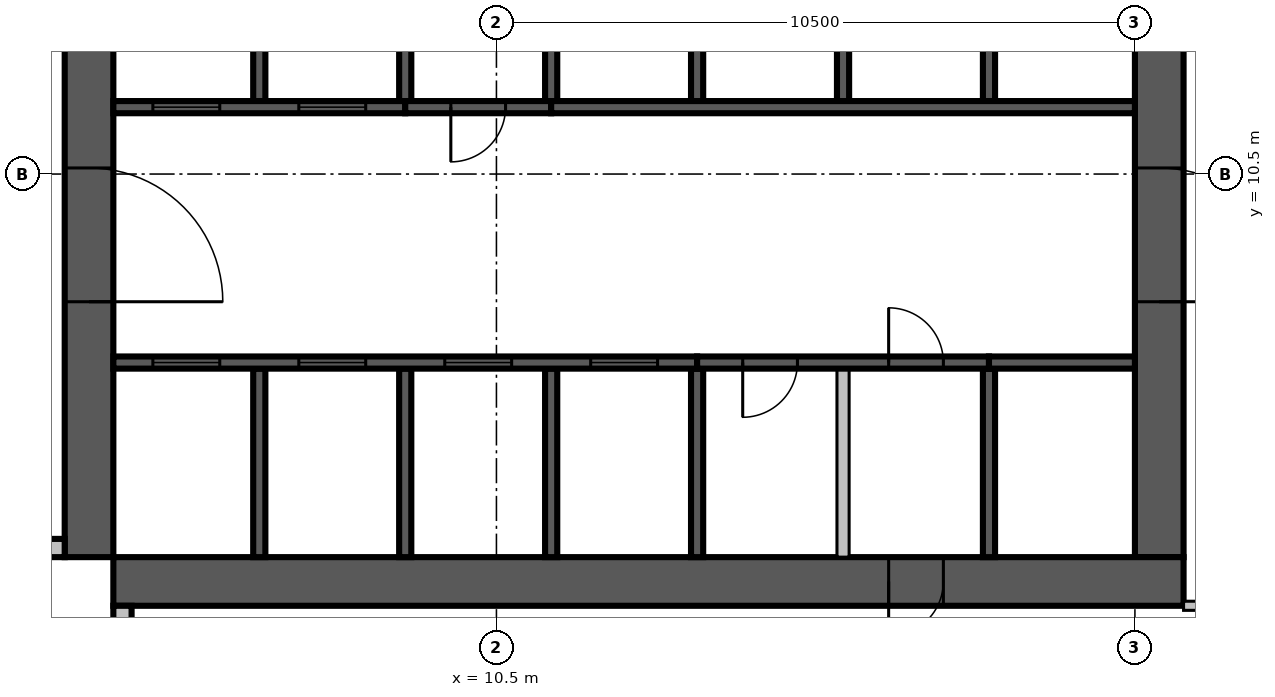
"""IFC4 building model, lengths in metres.
Left out: names, types, materials, properties, quantities, classifications, styles, units other than length and angle.
Written with IfcOpenShell. Run it as: python <this file> out.ifc"""

import sys

from ifc_helpers import new_model, si_unit, direction, frame, frame_2d, origin, place, context, subcontext, project, spatial, rectangle, extrude, source, transform, mapped, element, fill, save


model = new_model("IFC4")
c1 = context("Model", 3, precision=1e-05, world=origin(), true_north=direction((0.0, 1.0)))
c2 = subcontext(c1, "Body", "Model", "MODEL_VIEW")
j1 = project(units=[si_unit("LENGTHUNIT", "METRE"), si_unit("PLANEANGLEUNIT", "RADIAN")], contexts=[c1])
p1 = place(None, origin())
s1 = spatial("IfcSite", under=j1, at=p1, CompositionType="ELEMENT")
p2 = place(p1, origin())
s2 = spatial("IfcBuilding", under=s1, at=p2, CompositionType="ELEMENT")
p3 = place(p2, frame((0.0, 0.0, 238.6)))
s3 = spatial("IfcBuildingStorey", under=s2, at=p3, CompositionType="ELEMENT", Elevation=238.6)
m1 = source(origin(), c2, "Body", "SweptSolid", [
    extrude(rectangle(XDim=17.6, YDim=0.8, at=frame_2d((8.8, 0.0))), origin(), (0.0, 0.0, 1.0), 3.8),
])
p4 = place(p3, frame((3.8, 4.2, 0.0), z_axis=(0.0, 0.0, 1.0), x_axis=(0.0, 1.0, 0.0)))
e1 = element("IfcWall", 1, at=p4, inside=s3, PredefinedType="SHEAR", context=c2, shape_type="MappedRepresentation", body=[
    mapped(m1, transform((0.0, 0.0, 0.0), scale=1.0)),
])
m2 = source(origin(), c2, "Body", "SweptSolid", [
    extrude(rectangle(XDim=2.2, YDim=2.1, at=frame_2d((1.1, 1.05))), frame((0.0, 0.41, 0.0), z_axis=(0.0, -1.0, 0.0), x_axis=(1.0, 0.0, 0.0)), (0.0, 0.0, 1.0), 0.82),
])
p5 = place(p4, frame((4.2, 0.0, 0.0)))
e2 = element("IfcOpeningElement", 2, at=p5, cuts=e1, PredefinedType="OPENING", context=c2, shape_type="MappedRepresentation", body=[
    mapped(m2, transform((0.0, 0.0, 0.0), scale=1.0)),
])
m3 = source(origin(), c2, "Body", "SweptSolid", [
    extrude(rectangle(XDim=0.9, YDim=2.1, at=frame_2d((0.45, 1.05))), frame((0.0, 0.41, 0.0), z_axis=(0.0, -1.0, 0.0), x_axis=(1.0, 0.0, 0.0)), (0.0, 0.0, 1.0), 0.82),
])
p6 = place(p4, frame((10.95, 0.0, 0.0)))
e3 = element("IfcOpeningElement", 3, at=p6, cuts=e1, PredefinedType="OPENING", context=c2, shape_type="MappedRepresentation", body=[
    mapped(m3, transform((0.0, 0.0, 0.0), scale=1.0)),
])
m4 = source(origin(), c2, "Body", "SweptSolid", [
    extrude(rectangle(XDim=16.8, YDim=0.8, at=frame_2d((8.4, 0.0))), origin(), (0.0, 0.0, 1.0), 3.8),
])
p7 = place(p3, frame((21.4, 4.2, 0.0), z_axis=(0.0, 0.0, 1.0), x_axis=(0.0, 1.0, 0.0)))
e4 = element("IfcWall", 4, at=p7, inside=s3, PredefinedType="SHEAR", context=c2, shape_type="MappedRepresentation", body=[
    mapped(m4, transform((0.0, 0.0, 0.0), scale=1.0)),
])
p8 = place(p7, frame((4.2, 0.0, 0.0)))
e5 = element("IfcOpeningElement", 5, at=p8, cuts=e4, PredefinedType="OPENING", context=c2, shape_type="MappedRepresentation", body=[
    mapped(m2, transform((0.0, 0.0, 0.0), scale=1.0)),
])
m5 = source(origin(), c2, "Body", "SweptSolid", [
    extrude(rectangle(XDim=1.2, YDim=2.1, at=frame_2d((0.6, 1.05))), frame((0.0, 0.41, 0.0), z_axis=(0.0, -1.0, 0.0), x_axis=(1.0, 0.0, 0.0)), (0.0, 0.0, 1.0), 0.82),
])
p9 = place(p7, frame((14.7, 0.0, 0.0)))
e6 = element("IfcOpeningElement", 6, at=p9, cuts=e4, PredefinedType="OPENING", context=c2, shape_type="MappedRepresentation", body=[
    mapped(m5, transform((0.0, 0.0, 0.0), scale=1.0)),
])
p10 = place(p3, frame((4.2, 3.8, 0.0), z_axis=(0.0, 0.0, 1.0), x_axis=(1.0, 0.0, 0.0)))
e7 = element("IfcWall", 7, at=p10, inside=s3, PredefinedType="SHEAR", context=c2, shape_type="MappedRepresentation", body=[
    mapped(m1, transform((0.0, 0.0, 0.0), scale=1.0)),
])
p11 = place(p10, frame((12.75, 0.0, 0.0)))
e8 = element("IfcOpeningElement", 8, at=p11, cuts=e7, PredefinedType="OPENING", context=c2, shape_type="MappedRepresentation", body=[
    mapped(m3, transform((0.0, 0.0, 0.0), scale=1.0)),
])
m6 = source(origin(), c2, "Body", "SweptSolid", [
    extrude(rectangle(XDim=3.4, YDim=0.3, at=frame_2d((1.7, 0.0))), origin(), (0.0, 0.0, 1.0), 3.4),
])
p12 = place(p3, frame((0.0, 4.35, 0.0), z_axis=(0.0, 0.0, 1.0), x_axis=(1.0, 0.0, 0.0)))
e9 = element("IfcWall", 9, at=p12, inside=s3, PredefinedType="STANDARD", context=c2, shape_type="MappedRepresentation", body=[
    mapped(m6, transform((0.0, 0.0, 0.0), scale=1.0)),
])
m7 = source(origin(), c2, "Body", "SweptSolid", [
    extrude(rectangle(XDim=1.8, YDim=2.3, at=frame_2d((0.9, 1.15))), frame((0.0, 0.16, 0.0), z_axis=(0.0, -1.0, 0.0), x_axis=(1.0, 0.0, 0.0)), (0.0, 0.0, 1.0), 0.32),
])
p13 = place(p12, frame((1.2, 0.0, 0.6)))
e10 = element("IfcOpeningElement", 10, at=p13, cuts=e9, PredefinedType="OPENING", context=c2, shape_type="MappedRepresentation", body=[
    mapped(m7, transform((0.0, 0.0, 0.0), scale=1.0)),
])
p14 = place(p3, frame((4.35, 3.4, 0.0), z_axis=(0.0, 0.0, 1.0), x_axis=(0.0, -1.0, 0.0)))
e11 = element("IfcWall", 11, at=p14, inside=s3, PredefinedType="STANDARD", context=c2, shape_type="MappedRepresentation", body=[
    mapped(m6, transform((0.0, 0.0, 0.0), scale=1.0)),
])
p15 = place(p14, frame((0.4, 0.0, 0.6)))
e12 = element("IfcOpeningElement", 12, at=p15, cuts=e11, PredefinedType="OPENING", context=c2, shape_type="MappedRepresentation", body=[
    mapped(m7, transform((0.0, 0.0, 0.0), scale=1.0)),
])
m8 = source(origin(), c2, "Body", "SweptSolid", [
    extrude(rectangle(XDim=3.1, YDim=0.2, at=frame_2d((1.55, 0.0))), origin(), (0.0, 0.0, 1.0), 3.8),
])
for number, where, z_axis, x_axis in (
    (13, (6.6, 4.2, 0.0), (0.0, 0.0, 1.0), (0.0, 1.0, 0.0)),
    (14, (9.0, 4.2, 0.0), (0.0, 0.0, 1.0), (0.0, 1.0, 0.0)),
    (15, (11.4, 4.2, 0.0), (0.0, 0.0, 1.0), (0.0, 1.0, 0.0)),
):
    element("IfcWall", number, at=place(p3, frame(where, z_axis=z_axis, x_axis=x_axis)), inside=s3, PredefinedType="SOLIDWALL", context=c2, shape_type="MappedRepresentation", body=[
        mapped(m8, transform((0.0, 0.0, 0.0), scale=1.0)),
    ])
m9 = source(origin(), c2, "Body", "SweptSolid", [
    extrude(rectangle(XDim=3.1, YDim=0.2, at=frame_2d((1.55, 0.0))), origin(), (0.0, 0.0, 1.0), 3.4),
])
for number, where, z_axis, x_axis in (
    (16, (13.8, 4.2, 0.0), (0.0, 0.0, 1.0), (0.0, 1.0, 0.0)),
    (17, (18.6, 4.2, 0.0), (0.0, 0.0, 1.0), (0.0, 1.0, 0.0)),
):
    element("IfcWall", number, at=place(p3, frame(where, z_axis=z_axis, x_axis=x_axis)), inside=s3, PredefinedType="SOLIDWALL", context=c2, shape_type="MappedRepresentation", body=[
        mapped(m9, transform((0.0, 0.0, 0.0), scale=1.0)),
    ])
m10 = source(origin(), c2, "Body", "SweptSolid", [
    extrude(rectangle(XDim=3.1, YDim=0.2, at=frame_2d((1.55, 0.0))), origin(), (0.0, 0.0, 1.0), 3.4),
])
p16 = place(p3, frame((16.2, 4.2, 0.0), z_axis=(0.0, 0.0, 1.0), x_axis=(0.0, 1.0, 0.0)))
e18 = element("IfcWall", 18, at=p16, inside=s3, PredefinedType="PARTITIONING", context=c2, shape_type="MappedRepresentation", body=[
    mapped(m10, transform((0.0, 0.0, 0.0), scale=1.0)),
])
m11 = source(origin(), c2, "Body", "SweptSolid", [
    extrude(rectangle(XDim=3.0, YDim=0.2, at=frame_2d((1.5, 0.0))), origin(), (0.0, 0.0, 1.0), 3.8),
])
p17 = place(p3, frame((6.6, 11.7, 0.0), z_axis=(0.0, 0.0, 1.0), x_axis=(0.0, 1.0, 0.0)))
e19 = element("IfcWall", 19, at=p17, inside=s3, PredefinedType="SOLIDWALL", context=c2, shape_type="MappedRepresentation", body=[
    mapped(m11, transform((0.0, 0.0, 0.0), scale=1.0)),
])
m12 = source(origin(), c2, "Body", "SweptSolid", [
    extrude(rectangle(XDim=3.0, YDim=0.2, at=frame_2d((1.5, 0.0))), origin(), (0.0, 0.0, 1.0), 3.4),
])
for number, where, z_axis, x_axis in (
    (20, (9.0, 11.7, 0.0), (0.0, 0.0, 1.0), (0.0, 1.0, 0.0)),
    (21, (11.4, 11.7, 0.0), (0.0, 0.0, 1.0), (0.0, 1.0, 0.0)),
):
    element("IfcWall", number, at=place(p3, frame(where, z_axis=z_axis, x_axis=x_axis)), inside=s3, PredefinedType="SOLIDWALL", context=c2, shape_type="MappedRepresentation", body=[
        mapped(m12, transform((0.0, 0.0, 0.0), scale=1.0)),
    ])
for number, where, z_axis, x_axis in (
    (22, (13.8, 11.7, 0.0), (0.0, 0.0, 1.0), (0.0, 1.0, 0.0)),
    (23, (16.2, 11.7, 0.0), (0.0, 0.0, 1.0), (0.0, 1.0, 0.0)),
    (24, (18.6, 11.7, 0.0), (0.0, 0.0, 1.0), (0.0, 1.0, 0.0)),
):
    element("IfcWall", number, at=place(p3, frame(where, z_axis=z_axis, x_axis=x_axis)), inside=s3, PredefinedType="SOLIDWALL", context=c2, shape_type="MappedRepresentation", body=[
        mapped(m11, transform((0.0, 0.0, 0.0), scale=1.0)),
    ])
m13 = source(origin(), c2, "Body", "SweptSolid", [
    extrude(rectangle(XDim=9.6, YDim=0.2, at=frame_2d((4.8, 0.0))), origin(), (0.0, 0.0, 1.0), 3.8),
])
p18 = place(p3, frame((4.2, 7.4, 0.0), z_axis=(0.0, 0.0, 1.0), x_axis=(1.0, 0.0, 0.0)))
e25 = element("IfcWall", 25, at=p18, inside=s3, PredefinedType="SOLIDWALL", context=c2, shape_type="MappedRepresentation", body=[
    mapped(m13, transform((0.0, 0.0, 0.0), scale=1.0)),
])
m14 = source(origin(), c2, "Body", "SweptSolid", [
    extrude(rectangle(XDim=1.1, YDim=2.1, at=frame_2d((0.55, 1.05))), frame((0.0, 0.11, 0.0), z_axis=(0.0, -1.0, 0.0), x_axis=(1.0, 0.0, 0.0)), (0.0, 0.0, 1.0), 0.22),
])
p19 = place(p18, frame((0.65, 0.0, 0.0)))
e26 = element("IfcOpeningElement", 26, at=p19, cuts=e25, PredefinedType="OPENING", context=c2, shape_type="MappedRepresentation", body=[
    mapped(m14, transform((0.0, 0.0, 0.0), scale=1.0)),
])
p20 = place(p18, frame((3.05, 0.0, 0.0)))
e27 = element("IfcOpeningElement", 27, at=p20, cuts=e25, PredefinedType="OPENING", context=c2, shape_type="MappedRepresentation", body=[
    mapped(m14, transform((0.0, 0.0, 0.0), scale=1.0)),
])
p21 = place(p18, frame((5.45, 0.0, 0.0)))
e28 = element("IfcOpeningElement", 28, at=p21, cuts=e25, PredefinedType="OPENING", context=c2, shape_type="MappedRepresentation", body=[
    mapped(m14, transform((0.0, 0.0, 0.0), scale=1.0)),
])
p22 = place(p18, frame((7.85, 0.0, 0.0)))
e29 = element("IfcOpeningElement", 29, at=p22, cuts=e25, PredefinedType="OPENING", context=c2, shape_type="MappedRepresentation", body=[
    mapped(m14, transform((0.0, 0.0, 0.0), scale=1.0)),
])
m15 = source(origin(), c2, "Body", "SweptSolid", [
    extrude(rectangle(XDim=4.8, YDim=0.2, at=frame_2d((2.4, 0.0))), origin(), (0.0, 0.0, 1.0), 3.4),
])
p23 = place(p3, frame((13.8, 7.4, 0.0), z_axis=(0.0, 0.0, 1.0), x_axis=(1.0, 0.0, 0.0)))
e30 = element("IfcWall", 30, at=p23, inside=s3, PredefinedType="SOLIDWALL", context=c2, shape_type="MappedRepresentation", body=[
    mapped(m15, transform((0.0, 0.0, 0.0), scale=1.0)),
])
m16 = source(origin(), c2, "Body", "SweptSolid", [
    extrude(rectangle(XDim=0.9, YDim=2.1, at=frame_2d((0.45, 1.05))), frame((0.0, 0.11, 0.0), z_axis=(0.0, -1.0, 0.0), x_axis=(1.0, 0.0, 0.0)), (0.0, 0.0, 1.0), 0.22),
])
p24 = place(p23, frame((0.75, 0.0, 0.0)))
e31 = element("IfcOpeningElement", 31, at=p24, cuts=e30, PredefinedType="OPENING", context=c2, shape_type="MappedRepresentation", body=[
    mapped(m16, transform((0.0, 0.0, 0.0), scale=1.0)),
])
p25 = place(p23, frame((3.15, 0.0, 0.0)))
e32 = element("IfcOpeningElement", 32, at=p25, cuts=e30, PredefinedType="OPENING", context=c2, shape_type="MappedRepresentation", body=[
    mapped(m16, transform((0.0, 0.0, 0.0), scale=1.0)),
])
m17 = source(origin(), c2, "Body", "SweptSolid", [
    extrude(rectangle(XDim=2.4, YDim=0.2, at=frame_2d((1.2, 0.0))), origin(), (0.0, 0.0, 1.0), 3.8),
])
p26 = place(p3, frame((18.6, 7.4, 0.0), z_axis=(0.0, 0.0, 1.0), x_axis=(1.0, 0.0, 0.0)))
e33 = element("IfcWall", 33, at=p26, inside=s3, PredefinedType="SOLIDWALL", context=c2, shape_type="MappedRepresentation", body=[
    mapped(m17, transform((0.0, 0.0, 0.0), scale=1.0)),
])
m18 = source(origin(), c2, "Body", "SweptSolid", [
    extrude(rectangle(XDim=4.8, YDim=0.2, at=frame_2d((2.4, 0.0))), origin(), (0.0, 0.0, 1.0), 3.8),
])
p27 = place(p3, frame((4.2, 11.6, 0.0), z_axis=(0.0, 0.0, 1.0), x_axis=(1.0, 0.0, 0.0)))
e34 = element("IfcWall", 34, at=p27, inside=s3, PredefinedType="SOLIDWALL", context=c2, shape_type="MappedRepresentation", body=[
    mapped(m18, transform((0.0, 0.0, 0.0), scale=1.0)),
])
p28 = place(p27, frame((0.65, 0.0, 0.0)))
e35 = element("IfcOpeningElement", 35, at=p28, cuts=e34, PredefinedType="OPENING", context=c2, shape_type="MappedRepresentation", body=[
    mapped(m14, transform((0.0, 0.0, 0.0), scale=1.0)),
])
p29 = place(p27, frame((3.05, 0.0, 0.0)))
e36 = element("IfcOpeningElement", 36, at=p29, cuts=e34, PredefinedType="OPENING", context=c2, shape_type="MappedRepresentation", body=[
    mapped(m14, transform((0.0, 0.0, 0.0), scale=1.0)),
])
m19 = source(origin(), c2, "Body", "SweptSolid", [
    extrude(rectangle(XDim=2.4, YDim=0.2, at=frame_2d((1.2, 0.0))), origin(), (0.0, 0.0, 1.0), 3.4),
])
p30 = place(p3, frame((9.0, 11.6, 0.0), z_axis=(0.0, 0.0, 1.0), x_axis=(1.0, 0.0, 0.0)))
e37 = element("IfcWall", 37, at=p30, inside=s3, PredefinedType="SOLIDWALL", context=c2, shape_type="MappedRepresentation", body=[
    mapped(m19, transform((0.0, 0.0, 0.0), scale=1.0)),
])
p31 = place(p30, frame((0.75, 0.0, 0.0)))
e38 = element("IfcOpeningElement", 38, at=p31, cuts=e37, PredefinedType="OPENING", context=c2, shape_type="MappedRepresentation", body=[
    mapped(m16, transform((0.0, 0.0, 0.0), scale=1.0)),
])
p32 = place(p3, frame((11.4, 11.6, 0.0), z_axis=(0.0, 0.0, 1.0), x_axis=(1.0, 0.0, 0.0)))
e39 = element("IfcWall", 39, at=p32, inside=s3, PredefinedType="SOLIDWALL", context=c2, shape_type="MappedRepresentation", body=[
    mapped(m13, transform((0.0, 0.0, 0.0), scale=1.0)),
])
m20 = source(origin(), c2, "Body", "SweptSolid", [
    extrude(rectangle(XDim=7.525, YDim=0.15, at=frame_2d((3.763, 0.0))), origin(), (0.0, 0.0, 1.0), 2.9),
])
p33 = place(p3, frame((21.8, 3.4, 0.0), z_axis=(0.0, 0.0, 1.0), x_axis=(1.0, 0.0, 0.0)))
e40 = element("IfcWall", 40, at=p33, inside=s3, PredefinedType="PARTITIONING", context=c2, shape_type="MappedRepresentation", body=[
    mapped(m20, transform((0.0, 0.0, 0.0), scale=1.0)),
])
m21 = source(origin(), c2, "Body", "SweptSolid", [
    extrude(rectangle(XDim=1.0, YDim=2.1, at=frame_2d((0.5, 1.05))), frame((0.0, 0.085, 0.0), z_axis=(0.0, -1.0, 0.0), x_axis=(1.0, 0.0, 0.0)), (0.0, 0.0, 1.0), 0.17),
])
p34 = place(p33, frame((3.6, 0.0, 0.0)))
e41 = element("IfcOpeningElement", 41, at=p34, cuts=e40, PredefinedType="OPENING", context=c2, shape_type="MappedRepresentation", body=[
    mapped(m21, transform((0.0, 0.0, 0.0), scale=1.0)),
])
m22 = source(origin(), c2, "Body", "SweptSolid", [
    extrude(rectangle(XDim=0.9, YDim=2.1, at=frame_2d((0.45, 1.05))), frame((0.0, 0.085, 0.0), z_axis=(0.0, -1.0, 0.0), x_axis=(1.0, 0.0, 0.0)), (0.0, 0.0, 1.0), 0.17),
])
p35 = place(p33, frame((2.312, 0.0, 0.0)))
e42 = element("IfcOpeningElement", 42, at=p35, cuts=e40, PredefinedType="OPENING", context=c2, shape_type="MappedRepresentation", body=[
    mapped(m22, transform((0.0, 0.0, 0.0), scale=1.0)),
])
m23 = source(origin(), c2, "Body", "SweptSolid", [
    extrude(rectangle(XDim=1.1, YDim=2.1, at=frame_2d((0.55, 1.05))), frame((0.0, 0.025, 0.0), z_axis=(0.0, -1.0, 0.0), x_axis=(1.0, 0.0, 0.0)), (0.0, 0.0, 1.0), 0.05),
])
p36 = place(p19, origin())
e43 = element("IfcDoor", 43, at=p36, inside=s3, OperationType="SLIDING_TO_LEFT", PredefinedType="DOOR", context=c2, shape_type="MappedRepresentation", body=[
    mapped(m23, transform((0.0, 0.0, 0.0), scale=1.0)),
])
fill(e26, e43)
p37 = place(p20, origin())
e44 = element("IfcDoor", 44, at=p37, inside=s3, OperationType="SLIDING_TO_LEFT", PredefinedType="DOOR", context=c2, shape_type="MappedRepresentation", body=[
    mapped(m23, transform((0.0, 0.0, 0.0), scale=1.0)),
])
fill(e27, e44)
p38 = place(p21, origin())
e45 = element("IfcDoor", 45, at=p38, inside=s3, OperationType="SLIDING_TO_LEFT", PredefinedType="DOOR", context=c2, shape_type="MappedRepresentation", body=[
    mapped(m23, transform((0.0, 0.0, 0.0), scale=1.0)),
])
fill(e28, e45)
p39 = place(p22, origin())
e46 = element("IfcDoor", 46, at=p39, inside=s3, OperationType="SLIDING_TO_LEFT", PredefinedType="DOOR", context=c2, shape_type="MappedRepresentation", body=[
    mapped(m23, transform((0.0, 0.0, 0.0), scale=1.0)),
])
fill(e29, e46)
m24 = source(origin(), c2, "Body", "SweptSolid", [
    extrude(rectangle(XDim=0.9, YDim=2.1, at=frame_2d((0.45, 1.05))), frame((0.0, 0.025, 0.0), z_axis=(0.0, -1.0, 0.0), x_axis=(1.0, 0.0, 0.0)), (0.0, 0.0, 1.0), 0.05),
])
p40 = place(p24, origin())
e47 = element("IfcDoor", 47, at=p40, inside=s3, OperationType="SINGLE_SWING_RIGHT", PredefinedType="DOOR", context=c2, shape_type="MappedRepresentation", body=[
    mapped(m24, transform((0.0, 0.0, 0.0), scale=1.0)),
])
fill(e31, e47)
p41 = place(p25, origin())
e48 = element("IfcDoor", 48, at=p41, inside=s3, OperationType="SINGLE_SWING_LEFT", PredefinedType="DOOR", context=c2, shape_type="MappedRepresentation", body=[
    mapped(m24, transform((0.0, 0.0, 0.0), scale=1.0)),
])
fill(e32, e48)
p42 = place(p28, origin())
e49 = element("IfcDoor", 49, at=p42, inside=s3, OperationType="SLIDING_TO_LEFT", PredefinedType="DOOR", context=c2, shape_type="MappedRepresentation", body=[
    mapped(m23, transform((0.0, 0.0, 0.0), scale=1.0)),
])
fill(e35, e49)
p43 = place(p29, origin())
e50 = element("IfcDoor", 50, at=p43, inside=s3, OperationType="SLIDING_TO_LEFT", PredefinedType="DOOR", context=c2, shape_type="MappedRepresentation", body=[
    mapped(m23, transform((0.0, 0.0, 0.0), scale=1.0)),
])
fill(e36, e50)
p44 = place(p31, origin())
e51 = element("IfcDoor", 51, at=p44, inside=s3, OperationType="SINGLE_SWING_RIGHT", PredefinedType="DOOR", context=c2, shape_type="MappedRepresentation", body=[
    mapped(m24, transform((0.0, 0.0, 0.0), scale=1.0)),
])
fill(e38, e51)
m25 = source(origin(), c2, "Body", "SweptSolid", [
    extrude(rectangle(XDim=2.2, YDim=2.1, at=frame_2d((1.1, 1.05))), frame((0.0, 0.025, 0.0), z_axis=(0.0, -1.0, 0.0), x_axis=(1.0, 0.0, 0.0)), (0.0, 0.0, 1.0), 0.05),
])
p45 = place(p8, origin())
e52 = element("IfcDoor", 52, at=p45, inside=s3, OperationType="DOUBLE_DOOR_SINGLE_SWING", PredefinedType="DOOR", context=c2, shape_type="MappedRepresentation", body=[
    mapped(m25, transform((0.0, 0.0, 0.0), scale=1.0)),
])
fill(e5, e52)
p46 = place(p5, origin())
e53 = element("IfcDoor", 53, at=p46, inside=s3, OperationType="DOUBLE_DOOR_SINGLE_SWING", PredefinedType="DOOR", context=c2, shape_type="MappedRepresentation", body=[
    mapped(m25, transform((0.0, 0.0, 0.0), scale=1.0)),
])
fill(e2, e53)
p47 = place(p11, origin())
e54 = element("IfcDoor", 54, at=p47, inside=s3, OperationType="SINGLE_SWING_RIGHT", PredefinedType="DOOR", context=c2, shape_type="MappedRepresentation", body=[
    mapped(m24, transform((0.0, 0.0, 0.0), scale=1.0)),
])
fill(e8, e54)
save(model, sys.argv[1])
